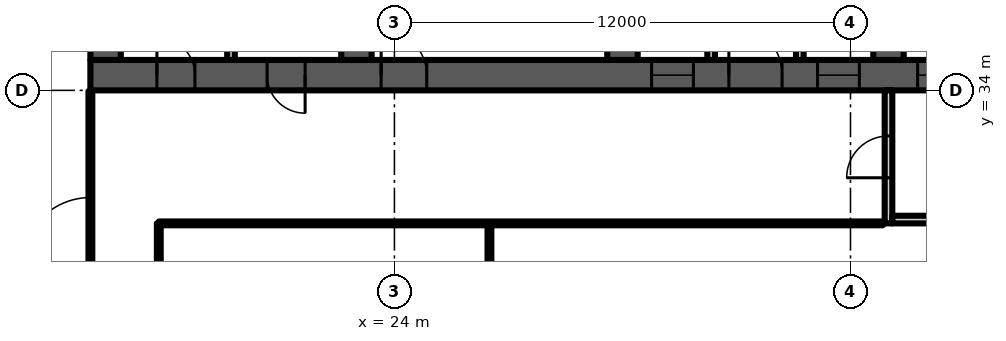
"""IFC4 building model, lengths in metres.
Left out: names, types, materials, properties, quantities, classifications, styles, units other than length and angle.
Written with IfcOpenShell. Run it as: python <this file> out.ifc"""

import sys

from ifc_helpers import new_model, si_unit, direction, frame, frame_2d, origin, place, context, subcontext, project, spatial, polyline, rectangle, outline, extrude, element, fill, save


model = new_model("IFC4")
c1 = context("Model", 3, precision=1e-05, world=origin(), true_north=direction((0.0, 1.0)))
c2 = subcontext(c1, "Body", "Model", "MODEL_VIEW")
j1 = project(units=[si_unit("LENGTHUNIT", "METRE"), si_unit("PLANEANGLEUNIT", "RADIAN")], contexts=[c1])
p1 = place(None, origin())
s1 = spatial("IfcSite", under=j1, at=p1, CompositionType="ELEMENT")
p2 = place(p1, origin())
s2 = spatial("IfcBuilding", under=s1, at=p2, CompositionType="ELEMENT")
p3 = place(p2, frame((0.0, 0.0, 177.1)))
s3 = spatial("IfcBuildingStorey", under=s2, at=p3, CompositionType="ELEMENT", Elevation=177.1)
p4 = place(p3, frame((16.0, 34.4, 0.0), z_axis=(0.0, 0.0, 1.0), x_axis=(1.0, 0.0, 0.0)))
e1 = element("IfcWall", 1, at=p4, inside=s3, PredefinedType="SHEAR", context=c2, shape_type="SweptSolid", body=[
    extrude(rectangle(XDim=42.0, YDim=0.8, at=frame_2d((21.0, 0.0))), origin(), (0.0, 0.0, 1.0), 3.6),
])
p5 = place(p4, frame((1.75, 0.0, 0.0)))
e2 = element("IfcOpeningElement", 2, at=p5, cuts=e1, PredefinedType="OPENING", context=c2, shape_type="SweptSolid", body=[
    extrude(rectangle(XDim=1.0, YDim=2.1, at=frame_2d((0.5, 1.05))), frame((0.0, 0.41, 0.0), z_axis=(0.0, -1.0, 0.0), x_axis=(1.0, 0.0, 0.0)), (0.0, 0.0, 1.0), 0.82),
])
p6 = place(p4, frame((4.65, 0.0, 0.0)))
e3 = element("IfcOpeningElement", 3, at=p6, cuts=e1, PredefinedType="OPENING", context=c2, shape_type="SweptSolid", body=[
    extrude(rectangle(XDim=1.0, YDim=2.1, at=frame_2d((0.5, 1.05))), frame((0.0, 0.41, 0.0), z_axis=(0.0, -1.0, 0.0), x_axis=(1.0, 0.0, 0.0)), (0.0, 0.0, 1.0), 0.82),
])
p7 = place(p4, frame((7.65, 0.0, 0.0)))
e4 = element("IfcOpeningElement", 4, at=p7, cuts=e1, PredefinedType="OPENING", context=c2, shape_type="SweptSolid", body=[
    extrude(rectangle(XDim=1.2, YDim=2.1, at=frame_2d((0.6, 1.05))), frame((0.0, 0.41, 0.0), z_axis=(0.0, -1.0, 0.0), x_axis=(1.0, 0.0, 0.0)), (0.0, 0.0, 1.0), 0.82),
])
p8 = place(p4, frame((14.767, 0.0, 0.0)))
e5 = element("IfcOpeningElement", 5, at=p8, cuts=e1, PredefinedType="OPENING", context=c2, shape_type="SweptSolid", body=[
    extrude(rectangle(XDim=1.1, YDim=2.1, at=frame_2d((0.55, 1.05))), frame((0.0, 0.41, 0.0), z_axis=(0.0, -1.0, 0.0), x_axis=(1.0, 0.0, 0.0)), (0.0, 0.0, 1.0), 0.82),
])
p9 = place(p4, frame((19.133, 0.0, 0.0)))
e6 = element("IfcOpeningElement", 6, at=p9, cuts=e1, PredefinedType="OPENING", context=c2, shape_type="SweptSolid", body=[
    extrude(rectangle(XDim=1.1, YDim=2.1, at=frame_2d((0.55, 1.05))), frame((0.0, 0.41, 0.0), z_axis=(0.0, -1.0, 0.0), x_axis=(1.0, 0.0, 0.0)), (0.0, 0.0, 1.0), 0.82),
])
p10 = place(p4, frame((16.8, 0.0, 0.0)))
e7 = element("IfcOpeningElement", 7, at=p10, cuts=e1, PredefinedType="OPENING", context=c2, shape_type="SweptSolid", body=[
    extrude(rectangle(XDim=1.4, YDim=2.1, at=frame_2d((0.7, 1.05))), frame((0.0, 0.41, 0.0), z_axis=(0.0, -1.0, 0.0), x_axis=(1.0, 0.0, 0.0)), (0.0, 0.0, 1.0), 0.82),
])
p11 = place(p4, frame((21.767, 0.0, 0.0)))
e8 = element("IfcOpeningElement", 8, at=p11, cuts=e1, PredefinedType="OPENING", context=c2, shape_type="SweptSolid", body=[
    extrude(rectangle(XDim=1.1, YDim=2.1, at=frame_2d((0.55, 1.05))), frame((0.0, 0.41, 0.0), z_axis=(0.0, -1.0, 0.0), x_axis=(1.0, 0.0, 0.0)), (0.0, 0.0, 1.0), 0.82),
])
p12 = place(p4, frame((23.95, 0.0, 0.0)))
e9 = element("IfcOpeningElement", 9, at=p12, cuts=e1, PredefinedType="OPENING", context=c2, shape_type="SweptSolid", body=[
    extrude(rectangle(XDim=1.1, YDim=2.1, at=frame_2d((0.55, 1.05))), frame((0.0, 0.41, 0.0), z_axis=(0.0, -1.0, 0.0), x_axis=(1.0, 0.0, 0.0)), (0.0, 0.0, 1.0), 0.82),
])
p13 = place(p4, frame((26.133, 0.0, 0.0)))
e10 = element("IfcOpeningElement", 10, at=p13, cuts=e1, PredefinedType="OPENING", context=c2, shape_type="SweptSolid", body=[
    extrude(rectangle(XDim=1.1, YDim=2.1, at=frame_2d((0.55, 1.05))), frame((0.0, 0.41, 0.0), z_axis=(0.0, -1.0, 0.0), x_axis=(1.0, 0.0, 0.0)), (0.0, 0.0, 1.0), 0.82),
])
p14 = place(p4, frame((33.15, 0.0, 0.0)))
e11 = element("IfcOpeningElement", 11, at=p14, cuts=e1, PredefinedType="OPENING", context=c2, shape_type="SweptSolid", body=[
    extrude(rectangle(XDim=1.2, YDim=2.1, at=frame_2d((0.6, 1.05))), frame((0.0, 0.41, 0.0), z_axis=(0.0, -1.0, 0.0), x_axis=(1.0, 0.0, 0.0)), (0.0, 0.0, 1.0), 0.82),
])
p15 = place(p4, frame((35.817, 0.0, 0.0)))
e12 = element("IfcOpeningElement", 12, at=p15, cuts=e1, PredefinedType="OPENING", context=c2, shape_type="SweptSolid", body=[
    extrude(rectangle(XDim=1.0, YDim=2.1, at=frame_2d((0.5, 1.05))), frame((0.0, 0.41, 0.0), z_axis=(0.0, -1.0, 0.0), x_axis=(1.0, 0.0, 0.0)), (0.0, 0.0, 1.0), 0.82),
])
p16 = place(p4, frame((39.95, 0.0, 0.0)))
e13 = element("IfcOpeningElement", 13, at=p16, cuts=e1, PredefinedType="OPENING", context=c2, shape_type="SweptSolid", body=[
    extrude(rectangle(XDim=1.0, YDim=2.1, at=frame_2d((0.5, 1.05))), frame((0.0, 0.41, 0.0), z_axis=(0.0, -1.0, 0.0), x_axis=(1.0, 0.0, 0.0)), (0.0, 0.0, 1.0), 0.82),
])
p17 = place(p4, frame((37.767, 0.0, 0.0)))
e14 = element("IfcOpeningElement", 14, at=p17, cuts=e1, PredefinedType="OPENING", context=c2, shape_type="SweptSolid", body=[
    extrude(rectangle(XDim=1.4, YDim=2.1, at=frame_2d((0.7, 1.05))), frame((0.0, 0.41, 0.0), z_axis=(0.0, -1.0, 0.0), x_axis=(1.0, 0.0, 0.0)), (0.0, 0.0, 1.0), 0.82),
])
p18 = place(p3, frame((16.4, 34.8, 0.0), z_axis=(0.0, 0.0, 1.0), x_axis=(0.0, 1.0, 0.0)))
e15 = element("IfcWall", 15, at=p18, inside=s3, PredefinedType="SHEAR", context=c2, shape_type="SweptSolid", body=[
    extrude(rectangle(XDim=13.184, YDim=0.8, at=frame_2d((6.592, 0.0))), origin(), (0.0, 0.0, 1.0), 3.6),
])
p19 = place(p3, frame((23.0, 34.8, 0.0), z_axis=(0.0, 0.0, 1.0), x_axis=(0.0, 1.0, 0.0)))
e16 = element("IfcWall", 16, at=p19, inside=s3, PredefinedType="SHEAR", context=c2, shape_type="SweptSolid", body=[
    extrude(rectangle(XDim=13.762, YDim=0.8, at=frame_2d((6.881, 0.0))), origin(), (0.0, 0.0, 1.0), 3.6),
])
p20 = place(p19, frame((10.0, 0.0, 0.0)))
e17 = element("IfcOpeningElement", 17, at=p20, cuts=e16, PredefinedType="OPENING", context=c2, shape_type="SweptSolid", body=[
    extrude(rectangle(XDim=1.0, YDim=2.1, at=frame_2d((0.5, 1.05))), frame((0.0, 0.41, 0.0), z_axis=(0.0, -1.0, 0.0), x_axis=(1.0, 0.0, 0.0)), (0.0, 0.0, 1.0), 0.82),
])
p21 = place(p3, frame((30.0, 34.8, 0.0), z_axis=(0.0, 0.0, 1.0), x_axis=(0.0, 1.0, 0.0)))
e18 = element("IfcWall", 18, at=p21, inside=s3, PredefinedType="SHEAR", context=c2, shape_type="SweptSolid", body=[
    extrude(rectangle(XDim=14.374, YDim=0.8, at=frame_2d((7.187, 0.0))), origin(), (0.0, 0.0, 1.0), 3.6),
])
p22 = place(p21, frame((3.6, 0.0, 0.0)))
e19 = element("IfcOpeningElement", 19, at=p22, cuts=e18, PredefinedType="OPENING", context=c2, shape_type="SweptSolid", body=[
    extrude(rectangle(XDim=1.1, YDim=2.1, at=frame_2d((0.55, 1.05))), frame((0.0, 0.41, 0.0), z_axis=(0.0, -1.0, 0.0), x_axis=(1.0, 0.0, 0.0)), (0.0, 0.0, 1.0), 0.82),
])
p23 = place(p3, frame((37.0, 34.8, 0.0), z_axis=(0.0, 0.0, 1.0), x_axis=(0.0, 1.0, 0.0)))
e20 = element("IfcWall", 20, at=p23, inside=s3, PredefinedType="SHEAR", context=c2, shape_type="SweptSolid", body=[
    extrude(rectangle(XDim=14.987, YDim=0.8, at=frame_2d((7.493, 0.0))), origin(), (0.0, 0.0, 1.0), 3.6),
])
p24 = place(p23, frame((11.312, 0.0, 0.0)))
e21 = element("IfcOpeningElement", 21, at=p24, cuts=e20, PredefinedType="OPENING", context=c2, shape_type="SweptSolid", body=[
    extrude(rectangle(XDim=1.0, YDim=2.1, at=frame_2d((0.5, 1.05))), frame((0.0, 0.41, 0.0), z_axis=(0.0, -1.0, 0.0), x_axis=(1.0, 0.0, 0.0)), (0.0, 0.0, 1.0), 0.82),
])
p25 = place(p23, frame((3.6, 0.0, 0.0)))
e22 = element("IfcOpeningElement", 22, at=p25, cuts=e20, PredefinedType="OPENING", context=c2, shape_type="SweptSolid", body=[
    extrude(rectangle(XDim=1.1, YDim=2.1, at=frame_2d((0.55, 1.05))), frame((0.0, 0.41, 0.0), z_axis=(0.0, -1.0, 0.0), x_axis=(1.0, 0.0, 0.0)), (0.0, 0.0, 1.0), 0.82),
])
p26 = place(p3, frame((19.7, 34.8, 0.0), z_axis=(0.0, 0.0, 1.0), x_axis=(0.0, 1.0, 0.0)))
e23 = element("IfcWall", 23, at=p26, inside=s3, PredefinedType="PARTITIONING", context=c2, shape_type="SweptSolid", body=[
    extrude(rectangle(XDim=13.234, YDim=0.2, at=frame_2d((6.617, 0.0))), origin(), (0.0, 0.0, 1.0), 3.2),
])
p27 = place(p3, frame((0.0, 0.0, -0.0)))
e24 = element("IfcWall", 24, at=p27, inside=s3, PredefinedType="PARTITIONING", context=c2, shape_type="SweptSolid", body=[
    extrude(outline(polyline([(32.233, 37.65), (30.4, 37.65), (30.4, 37.85), (32.233, 37.85), (32.433, 37.85), (32.433, 34.8), (32.233, 34.8), (32.233, 37.65)])), origin(), (0.0, 0.0, 1.0), 3.2),
])
p28 = place(p3, frame((0.0, 0.0, -0.0)))
e25 = element("IfcWall", 25, at=p28, inside=s3, PredefinedType="PARTITIONING", context=c2, shape_type="SweptSolid", body=[
    extrude(outline(polyline([(34.567, 37.85), (34.767, 37.85), (36.6, 37.85), (36.6, 37.65), (34.767, 37.65), (34.767, 34.8), (34.567, 34.8), (34.567, 37.85)])), origin(), (0.0, 0.0, 1.0), 3.2),
])
p29 = place(p3, frame((0.0, 0.0, -0.0)))
e26 = element("IfcWall", 26, at=p29, inside=s3, PredefinedType="PARTITIONING", context=c2, shape_type="SweptSolid", body=[
    extrude(outline(polyline([(41.567, 37.1), (39.433, 37.1), (39.433, 34.8), (39.233, 34.8), (39.233, 37.65), (37.4, 37.65), (37.4, 37.85), (39.233, 37.85), (39.433, 37.85), (39.433, 37.3), (41.567, 37.3), (41.567, 37.55), (41.767, 37.55), (43.6, 37.55), (43.6, 37.35), (41.767, 37.35), (41.767, 34.8), (41.567, 34.8), (41.567, 37.1)])), origin(), (0.0, 0.0, 1.0), 3.2),
])
p30 = place(p3, frame((37.0, 30.5, 0.0), z_axis=(0.0, 0.0, 1.0), x_axis=(0.0, 1.0, 0.0)))
e27 = element("IfcWall", 27, at=p30, inside=s3, PredefinedType="PARTITIONING", context=c2, shape_type="SweptSolid", body=[
    extrude(rectangle(XDim=3.5, YDim=0.2, at=frame_2d((1.75, 0.0))), origin(), (0.0, 0.0, 1.0), 3.2),
])
p31 = place(p30, frame((1.2, 0.0, 0.0)))
e28 = element("IfcOpeningElement", 28, at=p31, cuts=e27, PredefinedType="OPENING", context=c2, shape_type="SweptSolid", body=[
    extrude(rectangle(XDim=1.1, YDim=2.1, at=frame_2d((0.55, 1.05))), frame((0.0, 0.11, 0.0), z_axis=(0.0, -1.0, 0.0), x_axis=(1.0, 0.0, 0.0)), (0.0, 0.0, 1.0), 0.22),
])
p32 = place(p3, frame((37.1, 30.6, 0.0), z_axis=(0.0, 0.0, 1.0), x_axis=(1.0, 0.0, 0.0)))
e29 = element("IfcWall", 29, at=p32, inside=s3, PredefinedType="PARTITIONING", context=c2, shape_type="SweptSolid", body=[
    extrude(rectangle(XDim=2.8, YDim=0.2, at=frame_2d((1.4, 0.0))), origin(), (0.0, 0.0, 1.0), 3.2),
])
p33 = place(p3, frame((16.0, 26.42, 0.0), z_axis=(0.0, 0.0, 1.0), x_axis=(0.0, 1.0, 0.0)))
e30 = element("IfcWall", 30, at=p33, inside=s3, PredefinedType="PARTITIONING", context=c2, shape_type="SweptSolid", body=[
    extrude(rectangle(XDim=7.56, YDim=0.1, at=frame_2d((3.78, 0.0))), origin(), (0.0, 0.0, 1.0), 3.2),
])
p34 = place(p33, frame((2.96, 0.0, 0.0)))
e31 = element("IfcOpeningElement", 31, at=p34, cuts=e30, PredefinedType="OPENING", context=c2, shape_type="SweptSolid", body=[
    extrude(rectangle(XDim=1.8, YDim=2.1, at=frame_2d((0.9, 1.05))), frame((0.0, 0.06, 0.0), z_axis=(0.0, -1.0, 0.0), x_axis=(1.0, 0.0, 0.0)), (0.0, 0.0, 1.0), 0.12),
])
p35 = place(p3, frame((17.8, 25.485, 0.0), z_axis=(0.0, 0.0, 1.0), x_axis=(0.0, 1.0, 0.0)))
e32 = element("IfcWall", 32, at=p35, inside=s3, PredefinedType="PARTITIONING", context=c2, shape_type="SweptSolid", body=[
    extrude(rectangle(XDim=5.015, YDim=0.1, at=frame_2d((2.507, 0.0))), origin(), (0.0, 0.0, 1.0), 3.2),
])
p36 = place(p3, frame((17.8, 30.5, 0.0), z_axis=(0.0, 0.0, 1.0), x_axis=(1.0, 0.0, 0.0)))
e33 = element("IfcWall", 33, at=p36, inside=s3, PredefinedType="PARTITIONING", context=c2, shape_type="SweptSolid", body=[
    extrude(rectangle(XDim=19.05, YDim=0.1, at=frame_2d((9.525, 0.0))), origin(), (0.0, 0.0, 1.0), 3.2),
])
p37 = place(p3, frame((26.5, 13.535, 0.0), z_axis=(0.0, 0.0, 1.0), x_axis=(0.0, 1.0, 0.0)))
e34 = element("IfcWall", 34, at=p37, inside=s3, PredefinedType="PARTITIONING", context=c2, shape_type="SweptSolid", body=[
    extrude(rectangle(XDim=16.965, YDim=0.1, at=frame_2d((8.482, 0.0))), origin(), (0.0, 0.0, 1.0), 3.2),
])
p38 = place(p5, origin())
e35 = element("IfcDoor", 35, at=p38, inside=s3, OperationType="SINGLE_SWING_LEFT", PredefinedType="DOOR", context=c2, shape_type="SweptSolid", body=[
    extrude(rectangle(XDim=1.0, YDim=2.1, at=frame_2d((0.5, 1.05))), frame((0.0, 0.4, 0.0), z_axis=(0.0, -1.0, 0.0), x_axis=(1.0, 0.0, 0.0)), (0.0, 0.0, 1.0), 0.8),
])
fill(e2, e35)
p39 = place(p6, origin())
e36 = element("IfcDoor", 36, at=p39, inside=s3, OperationType="SINGLE_SWING_RIGHT", PredefinedType="DOOR", context=c2, shape_type="SweptSolid", body=[
    extrude(rectangle(XDim=1.0, YDim=2.1, at=frame_2d((0.5, 1.05))), frame((0.0, 0.4, 0.0), z_axis=(0.0, -1.0, 0.0), x_axis=(1.0, 0.0, 0.0)), (0.0, 0.0, 1.0), 0.8),
])
fill(e3, e36)
p40 = place(p7, origin())
e37 = element("IfcDoor", 37, at=p40, inside=s3, OperationType="SINGLE_SWING_LEFT", PredefinedType="DOOR", context=c2, shape_type="SweptSolid", body=[
    extrude(rectangle(XDim=1.2, YDim=2.1, at=frame_2d((0.6, 1.05))), frame((0.0, 0.025, 0.0), z_axis=(0.0, -1.0, 0.0), x_axis=(1.0, 0.0, 0.0)), (0.0, 0.0, 1.0), 0.05),
])
fill(e4, e37)
p41 = place(p8, origin())
e38 = element("IfcDoor", 38, at=p41, inside=s3, OperationType="DOUBLE_DOOR_SLIDING", PredefinedType="DOOR", context=c2, shape_type="SweptSolid", body=[
    extrude(rectangle(XDim=1.1, YDim=2.1, at=frame_2d((0.55, 1.05))), frame((0.0, 0.025, 0.0), z_axis=(0.0, -1.0, 0.0), x_axis=(1.0, 0.0, 0.0)), (0.0, 0.0, 1.0), 0.05),
])
fill(e5, e38)
p42 = place(p9, origin())
e39 = element("IfcDoor", 39, at=p42, inside=s3, OperationType="DOUBLE_DOOR_SLIDING", PredefinedType="DOOR", context=c2, shape_type="SweptSolid", body=[
    extrude(rectangle(XDim=1.1, YDim=2.1, at=frame_2d((0.55, 1.05))), frame((0.0, 0.025, 0.0), z_axis=(0.0, -1.0, 0.0), x_axis=(1.0, 0.0, 0.0)), (0.0, 0.0, 1.0), 0.05),
])
fill(e6, e39)
p43 = place(p10, origin())
e40 = element("IfcDoor", 40, at=p43, inside=s3, OperationType="DOUBLE_DOOR_SINGLE_SWING", PredefinedType="DOOR", context=c2, shape_type="SweptSolid", body=[
    extrude(rectangle(XDim=1.4, YDim=2.1, at=frame_2d((0.7, 1.05))), frame((0.0, 0.025, 0.0), z_axis=(0.0, -1.0, 0.0), x_axis=(1.0, 0.0, 0.0)), (0.0, 0.0, 1.0), 0.05),
])
fill(e7, e40)
p44 = place(p11, origin())
e41 = element("IfcDoor", 41, at=p44, inside=s3, OperationType="DOUBLE_DOOR_SLIDING", PredefinedType="DOOR", context=c2, shape_type="SweptSolid", body=[
    extrude(rectangle(XDim=1.1, YDim=2.1, at=frame_2d((0.55, 1.05))), frame((0.0, 0.025, 0.0), z_axis=(0.0, -1.0, 0.0), x_axis=(1.0, 0.0, 0.0)), (0.0, 0.0, 1.0), 0.05),
])
fill(e8, e41)
p45 = place(p31, origin())
e42 = element("IfcDoor", 42, at=p45, inside=s3, OperationType="SINGLE_SWING_LEFT", PredefinedType="DOOR", context=c2, shape_type="SweptSolid", body=[
    extrude(rectangle(XDim=1.1, YDim=2.1, at=frame_2d((0.55, 1.05))), frame((0.0, 0.025, 0.0), z_axis=(0.0, -1.0, 0.0), x_axis=(1.0, 0.0, 0.0)), (0.0, 0.0, 1.0), 0.05),
])
fill(e28, e42)
p46 = place(p34, origin())
e43 = element("IfcDoor", 43, at=p46, inside=s3, OperationType="DOUBLE_DOOR_SINGLE_SWING", PredefinedType="DOOR", context=c2, shape_type="SweptSolid", body=[
    extrude(rectangle(XDim=1.8, YDim=2.1, at=frame_2d((0.9, 1.05))), frame((0.0, 0.025, 0.0), z_axis=(0.0, -1.0, 0.0), x_axis=(1.0, 0.0, 0.0)), (0.0, 0.0, 1.0), 0.05),
])
fill(e31, e43)
save(model, sys.argv[1])
